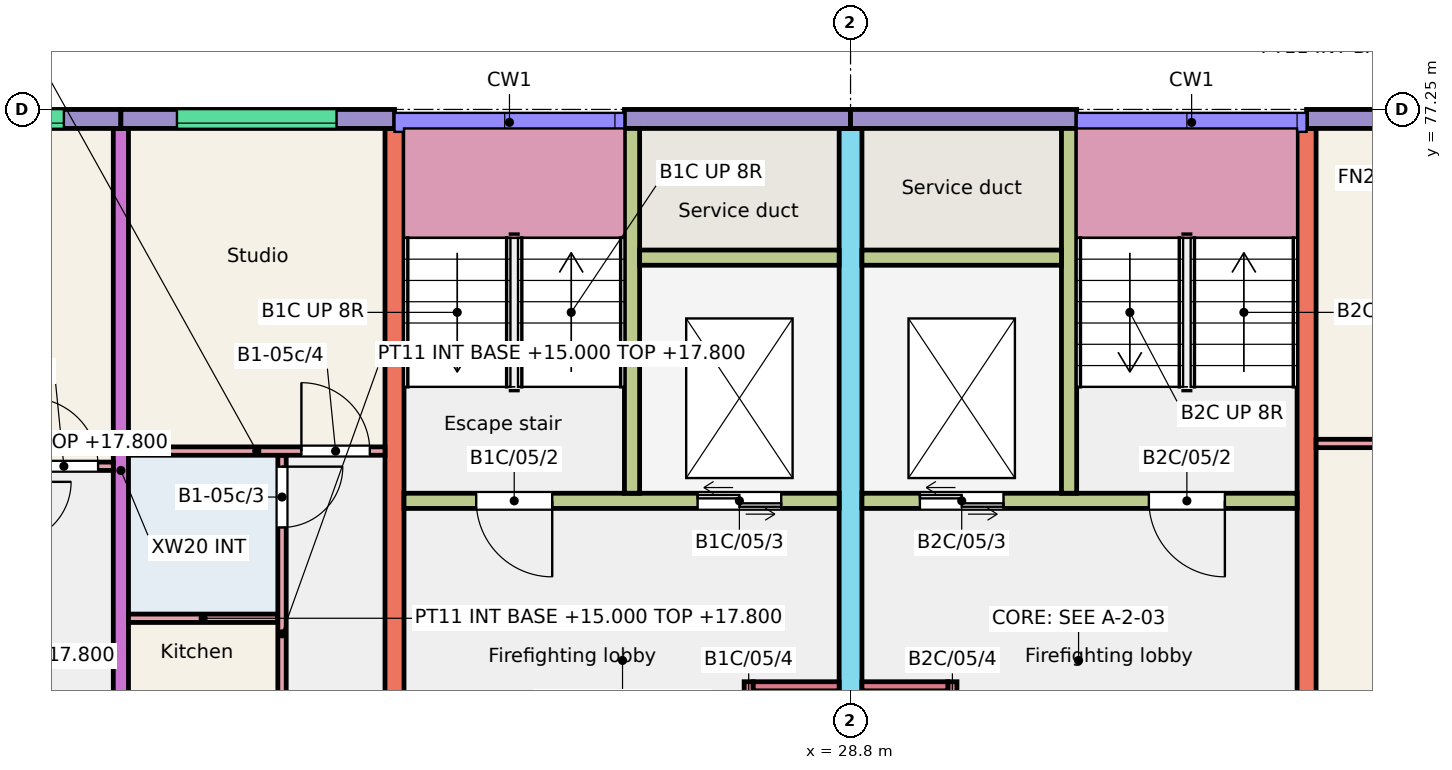
"""IFC4 building model, lengths in metres.
Left out: names, types, materials, properties, quantities, classifications, styles, units other than length and angle.
Written with IfcOpenShell. Run it as: python <this file> out.ifc"""

import sys

from ifc_helpers import new_model, si_unit, direction, frame, frame_2d, origin, place, context, subcontext, project, spatial, rectangle, extrude, element, fill, save


model = new_model("IFC4")
c1 = context("Model", 3, precision=1e-05, world=origin(), true_north=direction((0.0, 1.0)))
c2 = subcontext(c1, "Body", "Model", "MODEL_VIEW")
j1 = project(units=[si_unit("LENGTHUNIT", "METRE"), si_unit("PLANEANGLEUNIT", "RADIAN")], contexts=[c1])
p1 = place(None, origin())
s1 = spatial("IfcSite", under=j1, at=p1, CompositionType="ELEMENT")
p2 = place(p1, origin())
s2 = spatial("IfcBuilding", under=s1, at=p2, CompositionType="ELEMENT")
p3 = place(p2, frame((0.0, 0.0, 15.0)))
s3 = spatial("IfcBuildingStorey", under=s2, at=p3, CompositionType="ELEMENT", Elevation=15.0)
p4 = place(p3, frame((19.2, 68.0, 0.0), z_axis=(0.0, 0.0, 1.0), x_axis=(0.0, 1.0, 0.0)))
e1 = element("IfcWall", 1, at=p4, inside=s3, PredefinedType="SHEAR", context=c2, shape_type="SweptSolid", body=[
    extrude(rectangle(XDim=9.0, YDim=0.2, at=frame_2d((4.5, 0.0))), origin(), (0.0, 0.0, 1.0), 3.0),
])
p5 = place(p3, frame((22.8, 68.0, 0.0), z_axis=(0.0, 0.0, 1.0), x_axis=(0.0, 1.0, 0.0)))
e2 = element("IfcWall", 2, at=p5, inside=s3, PredefinedType="SHEAR", context=c2, shape_type="SweptSolid", body=[
    extrude(rectangle(XDim=9.0, YDim=0.25, at=frame_2d((4.5, 0.0))), origin(), (0.0, 0.0, 1.0), 3.0),
])
p6 = place(p3, frame((28.8, 66.0, 0.0), z_axis=(0.0, 0.0, 1.0), x_axis=(0.0, 1.0, 0.0)))
e3 = element("IfcWall", 3, at=p6, inside=s3, PredefinedType="SHEAR", context=c2, shape_type="SweptSolid", body=[
    extrude(rectangle(XDim=11.0, YDim=0.3, at=frame_2d((5.5, 0.0))), origin(), (0.0, 0.0, 1.0), 3.0),
])
p7 = place(p6, frame((0.3, 0.0, 0.0)))
e4 = element("IfcOpeningElement", 4, at=p7, cuts=e3, PredefinedType="OPENING", context=c2, shape_type="SweptSolid", body=[
    extrude(rectangle(XDim=1.2, YDim=2.1, at=frame_2d((0.6, 1.05))), frame((0.0, 0.16, 0.0), z_axis=(0.0, -1.0, 0.0), x_axis=(1.0, 0.0, 0.0)), (0.0, 0.0, 1.0), 0.32),
])
p8 = place(p3, frame((34.8, 68.0, 0.0), z_axis=(0.0, 0.0, 1.0), x_axis=(0.0, 1.0, 0.0)))
e5 = element("IfcWall", 5, at=p8, inside=s3, PredefinedType="SHEAR", context=c2, shape_type="SweptSolid", body=[
    extrude(rectangle(XDim=9.0, YDim=0.25, at=frame_2d((4.5, 0.0))), origin(), (0.0, 0.0, 1.0), 3.0),
])
p9 = place(p3, frame((15.6, 77.125, 0.0), z_axis=(0.0, 0.0, 1.0), x_axis=(1.0, 0.0, 0.0)))
e6 = element("IfcWall", 6, at=p9, inside=s3, PredefinedType="SOLIDWALL", context=c2, shape_type="SweptSolid", body=[
    extrude(rectangle(XDim=3.6, YDim=0.25, at=frame_2d((1.8, 0.0))), origin(), (0.0, 0.0, 1.0), 3.0),
])
p10 = place(p9, frame((0.75, 0.0, 1.2)))
e7 = element("IfcOpeningElement", 7, at=p10, cuts=e6, PredefinedType="OPENING", context=c2, shape_type="SweptSolid", body=[
    extrude(rectangle(XDim=2.1, YDim=1.2, at=frame_2d((1.05, 0.6))), frame((0.0, 0.135, 0.0), z_axis=(0.0, -1.0, 0.0), x_axis=(1.0, 0.0, 0.0)), (0.0, 0.0, 1.0), 0.27),
])
p11 = place(p3, frame((19.2, 77.125, 0.0), z_axis=(0.0, 0.0, 1.0), x_axis=(1.0, 0.0, 0.0)))
e8 = element("IfcWall", 8, at=p11, inside=s3, PredefinedType="SOLIDWALL", context=c2, shape_type="SweptSolid", body=[
    extrude(rectangle(XDim=3.6, YDim=0.25, at=frame_2d((1.8, 0.0))), origin(), (0.0, 0.0, 1.0), 3.0),
])
p12 = place(p11, frame((0.738, 0.0, 1.2)))
e9 = element("IfcOpeningElement", 9, at=p12, cuts=e8, PredefinedType="OPENING", context=c2, shape_type="SweptSolid", body=[
    extrude(rectangle(XDim=2.1, YDim=1.2, at=frame_2d((1.05, 0.6))), frame((0.0, 0.135, 0.0), z_axis=(0.0, -1.0, 0.0), x_axis=(1.0, 0.0, 0.0)), (0.0, 0.0, 1.0), 0.27),
])
p13 = place(p3, frame((25.825, 77.125, 0.0), z_axis=(0.0, 0.0, 1.0), x_axis=(1.0, 0.0, 0.0)))
e10 = element("IfcWall", 10, at=p13, inside=s3, PredefinedType="SOLIDWALL", context=c2, shape_type="SweptSolid", body=[
    extrude(rectangle(XDim=2.975, YDim=0.25, at=frame_2d((1.488, 0.0))), origin(), (0.0, 0.0, 1.0), 3.0),
])
p14 = place(p3, frame((22.925, 72.1, 0.0), z_axis=(0.0, 0.0, 1.0), x_axis=(1.0, 0.0, 0.0)))
e11 = element("IfcWall", 11, at=p14, inside=s3, PredefinedType="SHEAR", context=c2, shape_type="SweptSolid", body=[
    extrude(rectangle(XDim=5.725, YDim=0.2, at=frame_2d((2.862, 0.0))), origin(), (0.0, 0.0, 1.0), 3.0),
])
p15 = place(p14, frame((0.95, 0.0, 0.0)))
e12 = element("IfcOpeningElement", 12, at=p15, cuts=e11, PredefinedType="OPENING", context=c2, shape_type="SweptSolid", body=[
    extrude(rectangle(XDim=1.0, YDim=2.1, at=frame_2d((0.5, 1.05))), frame((0.0, 0.11, 0.0), z_axis=(0.0, -1.0, 0.0), x_axis=(1.0, 0.0, 0.0)), (0.0, 0.0, 1.0), 0.22),
])
p16 = place(p14, frame((3.863, 0.0, 0.0)))
e13 = element("IfcOpeningElement", 13, at=p16, cuts=e11, PredefinedType="OPENING", context=c2, shape_type="SweptSolid", body=[
    extrude(rectangle(XDim=1.1, YDim=2.1, at=frame_2d((0.55, 1.05))), frame((0.0, 0.11, 0.0), z_axis=(0.0, -1.0, 0.0), x_axis=(1.0, 0.0, 0.0)), (0.0, 0.0, 1.0), 0.22),
])
p17 = place(p3, frame((25.925, 72.2, 0.0), z_axis=(0.0, 0.0, 1.0), x_axis=(0.0, 1.0, 0.0)))
e14 = element("IfcWall", 14, at=p17, inside=s3, PredefinedType="SHEAR", context=c2, shape_type="SweptSolid", body=[
    extrude(rectangle(XDim=4.8, YDim=0.2, at=frame_2d((2.4, 0.0))), origin(), (0.0, 0.0, 1.0), 3.0),
])
p18 = place(p3, frame((26.025, 75.3, 0.0), z_axis=(0.0, 0.0, 1.0), x_axis=(1.0, 0.0, 0.0)))
e15 = element("IfcWall", 15, at=p18, inside=s3, PredefinedType="SHEAR", context=c2, shape_type="SweptSolid", body=[
    extrude(rectangle(XDim=2.625, YDim=0.2, at=frame_2d((1.312, 0.0))), origin(), (0.0, 0.0, 1.0), 3.0),
])
p19 = place(p3, frame((27.46, 68.0, 0.0), z_axis=(0.0, 0.0, 1.0), x_axis=(0.0, 1.0, 0.0)))
e16 = element("IfcWall", 16, at=p19, inside=s3, PredefinedType="SHEAR", context=c2, shape_type="SweptSolid", body=[
    extrude(rectangle(XDim=1.72, YDim=0.12, at=frame_2d((0.86, 0.0))), origin(), (0.0, 0.0, 1.0), 3.0),
])
p20 = place(p19, frame((0.45, 0.0, 0.0)))
e17 = element("IfcOpeningElement", 17, at=p20, cuts=e16, PredefinedType="OPENING", context=c2, shape_type="SweptSolid", body=[
    extrude(rectangle(XDim=0.9, YDim=2.1, at=frame_2d((0.45, 1.05))), frame((0.0, 0.07, 0.0), z_axis=(0.0, -1.0, 0.0), x_axis=(1.0, 0.0, 0.0)), (0.0, 0.0, 1.0), 0.14),
])
p21 = place(p3, frame((27.52, 69.66, 0.0), z_axis=(0.0, 0.0, 1.0), x_axis=(1.0, 0.0, 0.0)))
e18 = element("IfcWall", 18, at=p21, inside=s3, PredefinedType="SHEAR", context=c2, shape_type="SweptSolid", body=[
    extrude(rectangle(XDim=1.13, YDim=0.12, at=frame_2d((0.565, 0.0))), origin(), (0.0, 0.0, 1.0), 3.0),
])
p22 = place(p3, frame((28.8, 77.125, 0.0), z_axis=(0.0, 0.0, 1.0), x_axis=(1.0, 0.0, 0.0)))
e19 = element("IfcWall", 19, at=p22, inside=s3, PredefinedType="SOLIDWALL", context=c2, shape_type="SweptSolid", body=[
    extrude(rectangle(XDim=2.975, YDim=0.25, at=frame_2d((1.487, 0.0))), origin(), (0.0, 0.0, 1.0), 3.0),
])
p23 = place(p3, frame((28.95, 72.1, 0.0), z_axis=(0.0, 0.0, 1.0), x_axis=(1.0, 0.0, 0.0)))
e20 = element("IfcWall", 20, at=p23, inside=s3, PredefinedType="SHEAR", context=c2, shape_type="SweptSolid", body=[
    extrude(rectangle(XDim=5.725, YDim=0.2, at=frame_2d((2.863, 0.0))), origin(), (0.0, 0.0, 1.0), 3.0),
])
p24 = place(p23, frame((3.775, 0.0, 0.0)))
e21 = element("IfcOpeningElement", 21, at=p24, cuts=e20, PredefinedType="OPENING", context=c2, shape_type="SweptSolid", body=[
    extrude(rectangle(XDim=1.0, YDim=2.1, at=frame_2d((0.5, 1.05))), frame((0.0, 0.11, 0.0), z_axis=(0.0, -1.0, 0.0), x_axis=(1.0, 0.0, 0.0)), (0.0, 0.0, 1.0), 0.22),
])
p25 = place(p23, frame((0.762, 0.0, 0.0)))
e22 = element("IfcOpeningElement", 22, at=p25, cuts=e20, PredefinedType="OPENING", context=c2, shape_type="SweptSolid", body=[
    extrude(rectangle(XDim=1.1, YDim=2.1, at=frame_2d((0.55, 1.05))), frame((0.0, 0.11, 0.0), z_axis=(0.0, -1.0, 0.0), x_axis=(1.0, 0.0, 0.0)), (0.0, 0.0, 1.0), 0.22),
])
p26 = place(p3, frame((31.675, 72.2, 0.0), z_axis=(0.0, 0.0, 1.0), x_axis=(0.0, 1.0, 0.0)))
e23 = element("IfcWall", 23, at=p26, inside=s3, PredefinedType="SHEAR", context=c2, shape_type="SweptSolid", body=[
    extrude(rectangle(XDim=4.8, YDim=0.2, at=frame_2d((2.4, 0.0))), origin(), (0.0, 0.0, 1.0), 3.0),
])
p27 = place(p3, frame((28.95, 75.3, 0.0), z_axis=(0.0, 0.0, 1.0), x_axis=(1.0, 0.0, 0.0)))
e24 = element("IfcWall", 24, at=p27, inside=s3, PredefinedType="SHEAR", context=c2, shape_type="SweptSolid", body=[
    extrude(rectangle(XDim=2.625, YDim=0.2, at=frame_2d((1.312, 0.0))), origin(), (0.0, 0.0, 1.0), 3.0),
])
p28 = place(p3, frame((30.14, 68.0, 0.0), z_axis=(0.0, 0.0, 1.0), x_axis=(0.0, 1.0, 0.0)))
e25 = element("IfcWall", 25, at=p28, inside=s3, PredefinedType="SHEAR", context=c2, shape_type="SweptSolid", body=[
    extrude(rectangle(XDim=1.72, YDim=0.12, at=frame_2d((0.86, 0.0))), origin(), (0.0, 0.0, 1.0), 3.0),
])
p29 = place(p28, frame((0.45, 0.0, 0.0)))
e26 = element("IfcOpeningElement", 26, at=p29, cuts=e25, PredefinedType="OPENING", context=c2, shape_type="SweptSolid", body=[
    extrude(rectangle(XDim=0.9, YDim=2.1, at=frame_2d((0.45, 1.05))), frame((0.0, 0.07, 0.0), z_axis=(0.0, -1.0, 0.0), x_axis=(1.0, 0.0, 0.0)), (0.0, 0.0, 1.0), 0.14),
])
p30 = place(p3, frame((28.95, 69.66, 0.0), z_axis=(0.0, 0.0, 1.0), x_axis=(1.0, 0.0, 0.0)))
e27 = element("IfcWall", 27, at=p30, inside=s3, PredefinedType="SHEAR", context=c2, shape_type="SweptSolid", body=[
    extrude(rectangle(XDim=1.13, YDim=0.12, at=frame_2d((0.565, 0.0))), origin(), (0.0, 0.0, 1.0), 3.0),
])
p31 = place(p3, frame((34.8, 77.125, 0.0), z_axis=(0.0, 0.0, 1.0), x_axis=(1.0, 0.0, 0.0)))
e28 = element("IfcWall", 28, at=p31, inside=s3, PredefinedType="SOLIDWALL", context=c2, shape_type="SweptSolid", body=[
    extrude(rectangle(XDim=3.6, YDim=0.25, at=frame_2d((1.8, 0.0))), origin(), (0.0, 0.0, 1.0), 3.0),
])
p32 = place(p31, frame((1.212, 0.0, 1.1)))
e29 = element("IfcOpeningElement", 29, at=p32, cuts=e28, PredefinedType="OPENING", context=c2, shape_type="SweptSolid", body=[
    extrude(rectangle(XDim=1.2, YDim=1.3, at=frame_2d((0.6, 0.65))), frame((0.0, 0.135, 0.0), z_axis=(0.0, -1.0, 0.0), x_axis=(1.0, 0.0, 0.0)), (0.0, 0.0, 1.0), 0.27),
])
p33 = place(p3, frame((15.7, 72.555, 0.0), z_axis=(0.0, 0.0, 1.0), x_axis=(1.0, 0.0, 0.0)))
e30 = element("IfcWall", 30, at=p33, inside=s3, PredefinedType="PARTITIONING", context=c2, shape_type="SweptSolid", body=[
    extrude(rectangle(XDim=3.4, YDim=0.11, at=frame_2d((1.7, 0.0))), origin(), (0.0, 0.0, 1.0), 2.8),
])
p34 = place(p33, frame((2.3, 0.0, 0.0)))
e31 = element("IfcOpeningElement", 31, at=p34, cuts=e30, PredefinedType="OPENING", context=c2, shape_type="SweptSolid", body=[
    extrude(rectangle(XDim=0.9, YDim=2.1, at=frame_2d((0.45, 1.05))), frame((0.0, 0.065, 0.0), z_axis=(0.0, -1.0, 0.0), x_axis=(1.0, 0.0, 0.0)), (0.0, 0.0, 1.0), 0.13),
])
p35 = place(p3, frame((19.3, 70.555, 0.0), z_axis=(0.0, 0.0, 1.0), x_axis=(1.0, 0.0, 0.0)))
e32 = element("IfcWall", 32, at=p35, inside=s3, PredefinedType="PARTITIONING", context=c2, shape_type="SweptSolid", body=[
    extrude(rectangle(XDim=1.965, YDim=0.11, at=frame_2d((0.982, 0.0))), origin(), (0.0, 0.0, 1.0), 2.8),
])
p36 = place(p3, frame((21.32, 68.0, 0.0), z_axis=(0.0, 0.0, 1.0), x_axis=(0.0, 1.0, 0.0)))
e33 = element("IfcWall", 33, at=p36, inside=s3, PredefinedType="PARTITIONING", context=c2, shape_type="SweptSolid", body=[
    extrude(rectangle(XDim=4.7, YDim=0.11, at=frame_2d((2.35, 0.0))), origin(), (0.0, 0.0, 1.0), 2.8),
])
p37 = place(p36, frame((0.2, 0.0, 0.0)))
e34 = element("IfcOpeningElement", 34, at=p37, cuts=e33, PredefinedType="OPENING", context=c2, shape_type="SweptSolid", body=[
    extrude(rectangle(XDim=0.8, YDim=2.1, at=frame_2d((0.4, 1.05))), frame((0.0, 0.065, 0.0), z_axis=(0.0, -1.0, 0.0), x_axis=(1.0, 0.0, 0.0)), (0.0, 0.0, 1.0), 0.13),
])
p38 = place(p36, frame((3.75, 0.0, 0.0)))
e35 = element("IfcOpeningElement", 35, at=p38, cuts=e33, PredefinedType="OPENING", context=c2, shape_type="SweptSolid", body=[
    extrude(rectangle(XDim=0.8, YDim=2.1, at=frame_2d((0.4, 1.05))), frame((0.0, 0.065, 0.0), z_axis=(0.0, -1.0, 0.0), x_axis=(1.0, 0.0, 0.0)), (0.0, 0.0, 1.0), 0.13),
])
p39 = place(p3, frame((19.3, 72.755, 0.0), z_axis=(0.0, 0.0, 1.0), x_axis=(1.0, 0.0, 0.0)))
e36 = element("IfcWall", 36, at=p39, inside=s3, PredefinedType="PARTITIONING", context=c2, shape_type="SweptSolid", body=[
    extrude(rectangle(XDim=3.375, YDim=0.11, at=frame_2d((1.688, 0.0))), origin(), (0.0, 0.0, 1.0), 2.8),
])
p40 = place(p39, frame((2.275, 0.0, 0.0)))
e37 = element("IfcOpeningElement", 37, at=p40, cuts=e36, PredefinedType="OPENING", context=c2, shape_type="SweptSolid", body=[
    extrude(rectangle(XDim=0.9, YDim=2.1, at=frame_2d((0.45, 1.05))), frame((0.0, 0.065, 0.0), z_axis=(0.0, -1.0, 0.0), x_axis=(1.0, 0.0, 0.0)), (0.0, 0.0, 1.0), 0.13),
])
p41 = place(p3, frame((34.925, 72.855, 0.0), z_axis=(0.0, 0.0, 1.0), x_axis=(1.0, 0.0, 0.0)))
e38 = element("IfcWall", 38, at=p41, inside=s3, PredefinedType="PARTITIONING", context=c2, shape_type="SweptSolid", body=[
    extrude(rectangle(XDim=3.375, YDim=0.11, at=frame_2d((1.688, 0.0))), origin(), (0.0, 0.0, 1.0), 2.8),
])
p42 = place(p10, origin())
e39 = element("IfcWindow", 39, at=p42, inside=s3, PartitioningType="SINGLE_PANEL", PredefinedType="WINDOW", context=c2, shape_type="SweptSolid", body=[
    extrude(rectangle(XDim=2.1, YDim=1.2, at=frame_2d((1.05, 0.6))), frame((0.0, -0.025, 0.0), z_axis=(0.0, -1.0, 0.0), x_axis=(1.0, 0.0, 0.0)), (0.0, 0.0, 1.0), 0.06),
])
fill(e7, e39)
p43 = place(p12, origin())
e40 = element("IfcWindow", 40, at=p43, inside=s3, PartitioningType="SINGLE_PANEL", PredefinedType="WINDOW", context=c2, shape_type="SweptSolid", body=[
    extrude(rectangle(XDim=2.1, YDim=1.2, at=frame_2d((1.05, 0.6))), frame((0.0, -0.025, 0.0), z_axis=(0.0, -1.0, 0.0), x_axis=(1.0, 0.0, 0.0)), (0.0, 0.0, 1.0), 0.06),
])
fill(e9, e40)
p44 = place(p34, origin())
e41 = element("IfcDoor", 41, at=p44, inside=s3, OperationType="SINGLE_SWING_LEFT", PredefinedType="DOOR", context=c2, shape_type="SweptSolid", body=[
    extrude(rectangle(XDim=0.9, YDim=2.1, at=frame_2d((0.45, 1.05))), frame((0.0, 0.025, 0.0), z_axis=(0.0, -1.0, 0.0), x_axis=(1.0, 0.0, 0.0)), (0.0, 0.0, 1.0), 0.05),
])
fill(e31, e41)
p45 = place(p38, origin())
e42 = element("IfcDoor", 42, at=p45, inside=s3, OperationType="SINGLE_SWING_RIGHT", PredefinedType="DOOR", context=c2, shape_type="SweptSolid", body=[
    extrude(rectangle(XDim=0.8, YDim=2.1, at=frame_2d((0.4, 1.05))), frame((0.0, 0.025, 0.0), z_axis=(0.0, -1.0, 0.0), x_axis=(1.0, 0.0, 0.0)), (0.0, 0.0, 1.0), 0.05),
])
fill(e35, e42)
p46 = place(p40, origin())
e43 = element("IfcDoor", 43, at=p46, inside=s3, OperationType="SINGLE_SWING_LEFT", PredefinedType="DOOR", context=c2, shape_type="SweptSolid", body=[
    extrude(rectangle(XDim=0.9, YDim=2.1, at=frame_2d((0.45, 1.05))), frame((0.0, 0.025, 0.0), z_axis=(0.0, -1.0, 0.0), x_axis=(1.0, 0.0, 0.0)), (0.0, 0.0, 1.0), 0.05),
])
fill(e37, e43)
p47 = place(p15, origin())
e44 = element("IfcDoor", 44, at=p47, inside=s3, OperationType="SINGLE_SWING_RIGHT", PredefinedType="DOOR", context=c2, shape_type="SweptSolid", body=[
    extrude(rectangle(XDim=1.0, YDim=2.1, at=frame_2d((0.5, 1.05))), frame((0.0, 0.025, 0.0), z_axis=(0.0, -1.0, 0.0), x_axis=(1.0, 0.0, 0.0)), (0.0, 0.0, 1.0), 0.05),
])
fill(e12, e44)
p48 = place(p16, origin())
e45 = element("IfcDoor", 45, at=p48, inside=s3, OperationType="DOUBLE_DOOR_SLIDING", PredefinedType="DOOR", context=c2, shape_type="SweptSolid", body=[
    extrude(rectangle(XDim=1.1, YDim=2.1, at=frame_2d((0.55, 1.05))), frame((0.0, 0.025, 0.0), z_axis=(0.0, -1.0, 0.0), x_axis=(1.0, 0.0, 0.0)), (0.0, 0.0, 1.0), 0.05),
])
fill(e13, e45)
p49 = place(p24, origin())
e46 = element("IfcDoor", 46, at=p49, inside=s3, OperationType="SINGLE_SWING_RIGHT", PredefinedType="DOOR", context=c2, shape_type="SweptSolid", body=[
    extrude(rectangle(XDim=1.0, YDim=2.1, at=frame_2d((0.5, 1.05))), frame((0.0, 0.025, 0.0), z_axis=(0.0, -1.0, 0.0), x_axis=(1.0, 0.0, 0.0)), (0.0, 0.0, 1.0), 0.05),
])
fill(e21, e46)
p50 = place(p25, origin())
e47 = element("IfcDoor", 47, at=p50, inside=s3, OperationType="DOUBLE_DOOR_SLIDING", PredefinedType="DOOR", context=c2, shape_type="SweptSolid", body=[
    extrude(rectangle(XDim=1.1, YDim=2.1, at=frame_2d((0.55, 1.05))), frame((0.0, 0.025, 0.0), z_axis=(0.0, -1.0, 0.0), x_axis=(1.0, 0.0, 0.0)), (0.0, 0.0, 1.0), 0.05),
])
fill(e22, e47)
save(model, sys.argv[1])
